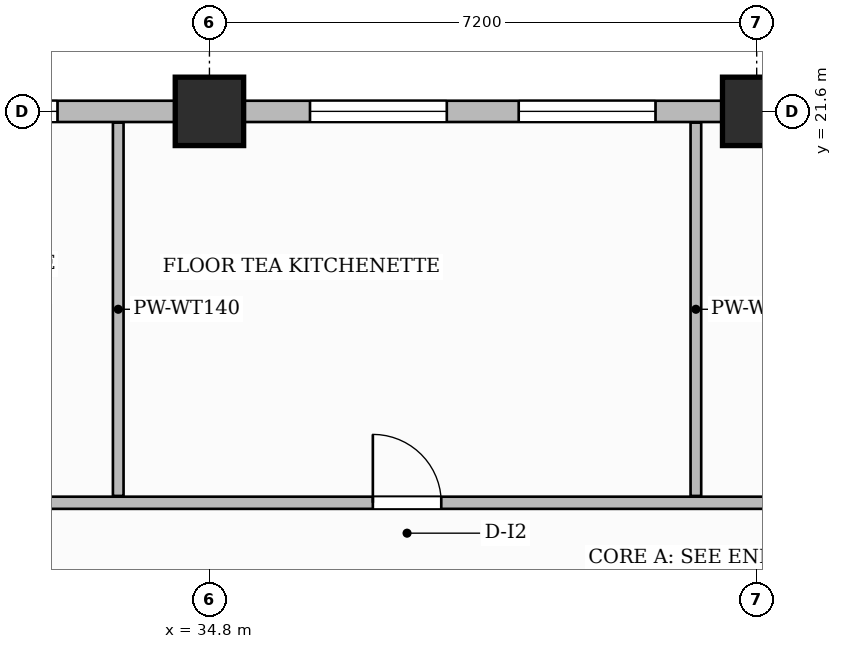
"""IFC4 building model, lengths in metres.
Left out: names, types, materials, properties, quantities, classifications, styles, units other than length and angle.
Written with IfcOpenShell. Run it as: python <this file> out.ifc"""

import sys

from ifc_helpers import new_model, si_unit, direction, frame, frame_2d, origin, origin_2d, place, context, subcontext, project, spatial, rectangle, extrude, source, transform, mapped, element, fill, save


model = new_model("IFC4")
c1 = context("Model", 3, precision=1e-05, world=origin(), true_north=direction((0.0, 1.0)))
c2 = subcontext(c1, "Body", "Model", "MODEL_VIEW")
j1 = project(units=[si_unit("LENGTHUNIT", "METRE"), si_unit("PLANEANGLEUNIT", "RADIAN")], contexts=[c1])
p1 = place(None, origin())
s1 = spatial("IfcSite", under=j1, at=p1, CompositionType="ELEMENT")
p2 = place(p1, origin())
s2 = spatial("IfcBuilding", under=s1, at=p2, CompositionType="ELEMENT")
p3 = place(p2, frame((0.0, 0.0, 244.25)))
s3 = spatial("IfcBuildingStorey", under=s2, at=p3, CompositionType="ELEMENT", Elevation=244.25)
m1 = source(origin(), c2, "Body", "SweptSolid", [
    extrude(rectangle(XDim=0.9, YDim=0.9, at=origin_2d()), origin(), (0.0, 0.0, 1.0), 3.85),
])
for number, where, z_axis, x_axis in (
    (1, (34.8, 21.6, 0.0), (0.0, 0.0, 1.0), (1.0, 0.0, 0.0)),
    (2, (42.0, 21.6, 0.0), (0.0, 0.0, 1.0), (1.0, 0.0, 0.0)),
):
    element("IfcColumn", number, at=place(p3, frame(where, z_axis=z_axis, x_axis=x_axis)), inside=s3, PredefinedType="COLUMN", context=c2, shape_type="MappedRepresentation", body=[
        mapped(m1, transform((0.0, 0.0, 0.0), scale=1.0)),
    ])
p4 = place(p3, frame((30.29, 16.45, 0.0), z_axis=(0.0, 0.0, 1.0), x_axis=(1.0, 0.0, 0.0)))
e3 = element("IfcWall", 3, at=p4, inside=s3, PredefinedType="PARTITIONING", context=c2, shape_type="SweptSolid", body=[
    extrude(rectangle(XDim=19.37, YDim=0.16, at=frame_2d((9.685, 0.0))), origin(), (0.0, 0.0, 1.0), 3.6),
])
p5 = place(p4, frame((1.185, 0.0, 0.0)))
e4 = element("IfcOpeningElement", 4, at=p5, cuts=e3, PredefinedType="OPENING", context=c2, shape_type="SweptSolid", body=[
    extrude(rectangle(XDim=0.85, YDim=2.1, at=frame_2d((0.425, 1.05))), frame((0.0, 0.09, 0.0), z_axis=(0.0, -1.0, 0.0), x_axis=(1.0, 0.0, 0.0)), (0.0, 0.0, 1.0), 0.18),
])
p6 = place(p4, frame((6.66, 0.0, 0.0)))
e5 = element("IfcOpeningElement", 5, at=p6, cuts=e3, PredefinedType="OPENING", context=c2, shape_type="SweptSolid", body=[
    extrude(rectangle(XDim=0.9, YDim=2.15, at=frame_2d((0.45, 1.075))), frame((0.0, 0.09, 0.0), z_axis=(0.0, -1.0, 0.0), x_axis=(1.0, 0.0, 0.0)), (0.0, 0.0, 1.0), 0.18),
])
p7 = place(p4, frame((14.46, 0.0, 0.0)))
e6 = element("IfcOpeningElement", 6, at=p7, cuts=e3, PredefinedType="OPENING", context=c2, shape_type="SweptSolid", body=[
    extrude(rectangle(XDim=1.4, YDim=2.35, at=frame_2d((0.7, 1.175))), frame((0.0, 0.09, 0.0), z_axis=(0.0, -1.0, 0.0), x_axis=(1.0, 0.0, 0.0)), (0.0, 0.0, 1.0), 0.18),
])
for number, where, z_axis, x_axis in (
    (7, (33.6, 16.54, 0.0), (0.0, 0.0, 1.0), (0.0, 1.0, 0.0)),
    (8, (41.2, 16.54, 0.0), (0.0, 0.0, 1.0), (0.0, 1.0, 0.0)),
):
    element("IfcWall", number, at=place(p3, frame(where, z_axis=z_axis, x_axis=x_axis)), inside=s3, PredefinedType="PARTITIONING", context=c2, shape_type="SweptSolid", body=[
        extrude(rectangle(XDim=4.912, YDim=0.14, at=frame_2d((2.456, 0.0))), origin(), (0.0, 0.0, 1.0), 3.6),
    ])
p8 = place(p3, frame((14.4, 21.6, 0.0), z_axis=(0.0, 0.0, 1.0), x_axis=(1.0, 0.0, 0.0)))
e9 = element("IfcWall", 9, at=p8, inside=s3, PredefinedType="SOLIDWALL", context=c2, shape_type="SweptSolid", body=[
    extrude(rectangle(XDim=35.4, YDim=0.28, at=frame_2d((17.7, 0.0))), origin(), (0.0, 0.0, 1.0), 3.135),
])
p9 = place(p8, frame((0.85, 0.0, 0.0)))
e10 = element("IfcOpeningElement", 10, at=p9, cuts=e9, PredefinedType="OPENING", context=c2, shape_type="SweptSolid", body=[
    extrude(rectangle(XDim=1.2, YDim=2.2, at=frame_2d((0.6, 1.1))), frame((0.0, 0.15, 0.0), z_axis=(0.0, -1.0, 0.0), x_axis=(1.0, 0.0, 0.0)), (0.0, 0.0, 1.0), 0.3),
])
p10 = place(p8, frame((2.771, 0.0, 0.8)))
e11 = element("IfcOpeningElement", 11, at=p10, cuts=e9, PredefinedType="OPENING", context=c2, shape_type="SweptSolid", body=[
    extrude(rectangle(XDim=1.4, YDim=1.85, at=frame_2d((0.7, 0.925))), frame((0.0, 0.15, 0.0), z_axis=(0.0, -1.0, 0.0), x_axis=(1.0, 0.0, 0.0)), (0.0, 0.0, 1.0), 0.3),
])
p11 = place(p8, frame((4.929, 0.0, 0.8)))
e12 = element("IfcOpeningElement", 12, at=p11, cuts=e9, PredefinedType="OPENING", context=c2, shape_type="SweptSolid", body=[
    extrude(rectangle(XDim=1.15, YDim=1.8, at=frame_2d((0.575, 0.9))), frame((0.0, 0.15, 0.0), z_axis=(0.0, -1.0, 0.0), x_axis=(1.0, 0.0, 0.0)), (0.0, 0.0, 1.0), 0.3),
])
p12 = place(p8, frame((8.496, 0.0, 0.8)))
e13 = element("IfcOpeningElement", 13, at=p12, cuts=e9, PredefinedType="OPENING", context=c2, shape_type="SweptSolid", body=[
    extrude(rectangle(XDim=1.8, YDim=1.85, at=frame_2d((0.9, 0.925))), frame((0.0, 0.15, 0.0), z_axis=(0.0, -1.0, 0.0), x_axis=(1.0, 0.0, 0.0)), (0.0, 0.0, 1.0), 0.3),
])
p13 = place(p8, frame((11.304, 0.0, 0.8)))
e14 = element("IfcOpeningElement", 14, at=p13, cuts=e9, PredefinedType="OPENING", context=c2, shape_type="SweptSolid", body=[
    extrude(rectangle(XDim=1.8, YDim=1.85, at=frame_2d((0.9, 0.925))), frame((0.0, 0.15, 0.0), z_axis=(0.0, -1.0, 0.0), x_axis=(1.0, 0.0, 0.0)), (0.0, 0.0, 1.0), 0.3),
])
p14 = place(p8, frame((16.601, 0.0, 0.8)))
e15 = element("IfcOpeningElement", 15, at=p14, cuts=e9, PredefinedType="OPENING", context=c2, shape_type="SweptSolid", body=[
    extrude(rectangle(XDim=1.8, YDim=1.85, at=frame_2d((0.9, 0.925))), frame((0.0, 0.15, 0.0), z_axis=(0.0, -1.0, 0.0), x_axis=(1.0, 0.0, 0.0)), (0.0, 0.0, 1.0), 0.3),
])
p15 = place(p8, frame((21.723, 0.0, 0.8)))
e16 = element("IfcOpeningElement", 16, at=p15, cuts=e9, PredefinedType="OPENING", context=c2, shape_type="SweptSolid", body=[
    extrude(rectangle(XDim=1.8, YDim=1.85, at=frame_2d((0.9, 0.925))), frame((0.0, 0.15, 0.0), z_axis=(0.0, -1.0, 0.0), x_axis=(1.0, 0.0, 0.0)), (0.0, 0.0, 1.0), 0.3),
])
p16 = place(p8, frame((24.469, 0.0, 0.8)))
e17 = element("IfcOpeningElement", 17, at=p16, cuts=e9, PredefinedType="OPENING", context=c2, shape_type="SweptSolid", body=[
    extrude(rectangle(XDim=1.8, YDim=1.85, at=frame_2d((0.9, 0.925))), frame((0.0, 0.15, 0.0), z_axis=(0.0, -1.0, 0.0), x_axis=(1.0, 0.0, 0.0)), (0.0, 0.0, 1.0), 0.3),
])
p17 = place(p8, frame((29.075, 0.0, 0.8)))
e18 = element("IfcOpeningElement", 18, at=p17, cuts=e9, PredefinedType="OPENING", context=c2, shape_type="SweptSolid", body=[
    extrude(rectangle(XDim=1.8, YDim=1.85, at=frame_2d((0.9, 0.925))), frame((0.0, 0.15, 0.0), z_axis=(0.0, -1.0, 0.0), x_axis=(1.0, 0.0, 0.0)), (0.0, 0.0, 1.0), 0.3),
])
p18 = place(p8, frame((32.125, 0.0, 0.8)))
e19 = element("IfcOpeningElement", 19, at=p18, cuts=e9, PredefinedType="OPENING", context=c2, shape_type="SweptSolid", body=[
    extrude(rectangle(XDim=1.8, YDim=1.85, at=frame_2d((0.9, 0.925))), frame((0.0, 0.15, 0.0), z_axis=(0.0, -1.0, 0.0), x_axis=(1.0, 0.0, 0.0)), (0.0, 0.0, 1.0), 0.3),
])
m2 = source(origin(), c2, "Body", "SweptSolid", [
    extrude(rectangle(XDim=0.9, YDim=2.15, at=frame_2d((0.45, 1.075))), frame((0.0, 0.025, 0.0), z_axis=(0.0, -1.0, 0.0), x_axis=(1.0, 0.0, 0.0)), (0.0, 0.0, 1.0), 0.05),
])
p19 = place(p6, origin())
e20 = element("IfcDoor", 20, at=p19, inside=s3, OperationType="SINGLE_SWING_LEFT", PredefinedType="DOOR", context=c2, shape_type="MappedRepresentation", body=[
    mapped(m2, transform((0.0, 0.0, 0.0), scale=1.0)),
])
fill(e5, e20)
m3 = source(origin(), c2, "Body", "SweptSolid", [
    extrude(rectangle(XDim=1.8, YDim=1.85, at=frame_2d((0.9, 0.925))), frame((0.0, 0.03, 0.0), z_axis=(0.0, -1.0, 0.0), x_axis=(1.0, 0.0, 0.0)), (0.0, 0.0, 1.0), 0.06),
])
p20 = place(p14, origin())
e21 = element("IfcWindow", 21, at=p20, inside=s3, PartitioningType="DOUBLE_PANEL_VERTICAL", PredefinedType="WINDOW", context=c2, shape_type="MappedRepresentation", body=[
    mapped(m3, transform((0.0, 0.0, 0.0), scale=1.0)),
])
fill(e15, e21)
p21 = place(p15, origin())
e22 = element("IfcWindow", 22, at=p21, inside=s3, PartitioningType="DOUBLE_PANEL_VERTICAL", PredefinedType="WINDOW", context=c2, shape_type="MappedRepresentation", body=[
    mapped(m3, transform((0.0, 0.0, 0.0), scale=1.0)),
])
fill(e16, e22)
p22 = place(p16, origin())
e23 = element("IfcWindow", 23, at=p22, inside=s3, PartitioningType="DOUBLE_PANEL_VERTICAL", PredefinedType="WINDOW", context=c2, shape_type="MappedRepresentation", body=[
    mapped(m3, transform((0.0, 0.0, 0.0), scale=1.0)),
])
fill(e17, e23)
save(model, sys.argv[1])
